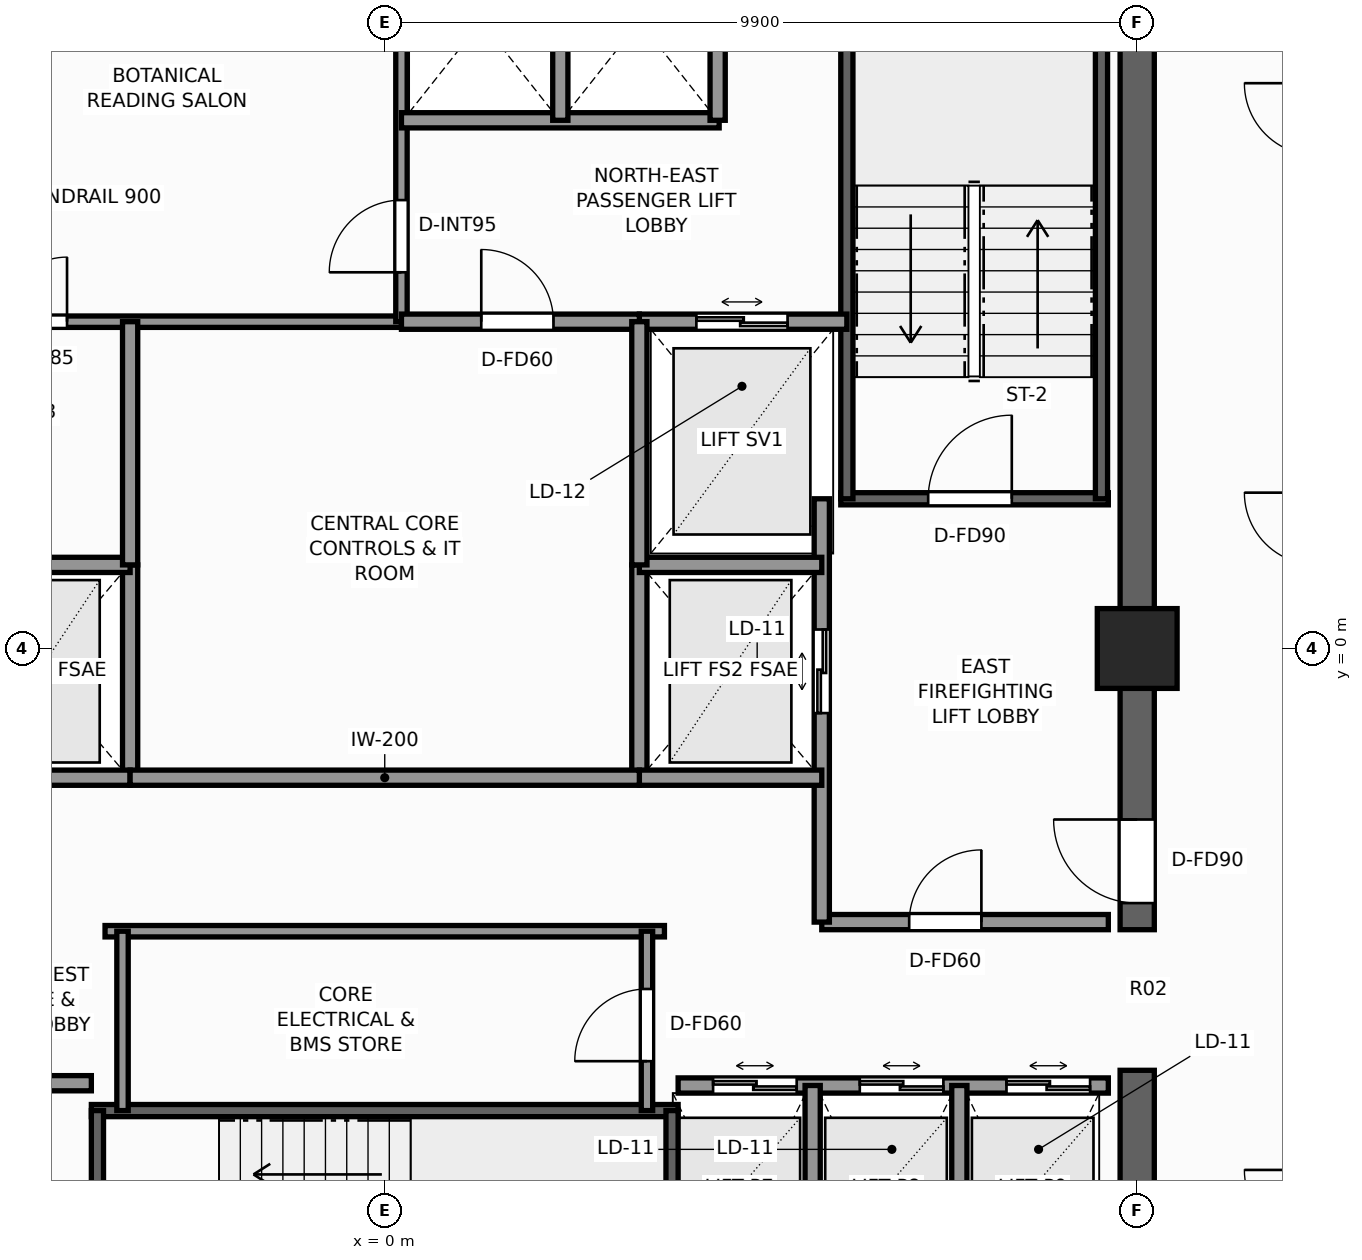
"""IFC4 building model, lengths in metres.
Left out: names, types, materials, properties, quantities, classifications, styles, units other than length and angle.
Written with IfcOpenShell. Run it as: python <this file> out.ifc"""

import sys

from ifc_helpers import new_model, si_unit, direction, frame, frame_2d, origin, origin_2d, place, context, subcontext, project, spatial, rectangle, extrude, element, fill, save


model = new_model("IFC4")
c1 = context("Model", 3, precision=1e-05, world=origin(), true_north=direction((0.0, 1.0)))
c2 = subcontext(c1, "Body", "Model", "MODEL_VIEW")
j1 = project(units=[si_unit("LENGTHUNIT", "METRE"), si_unit("PLANEANGLEUNIT", "RADIAN")], contexts=[c1])
p1 = place(None, origin())
s1 = spatial("IfcSite", under=j1, at=p1, CompositionType="ELEMENT")
p2 = place(p1, origin())
s2 = spatial("IfcBuilding", under=s1, at=p2, CompositionType="ELEMENT")
p3 = place(p2, frame((0.0, 0.0, 216.3)))
s3 = spatial("IfcBuildingStorey", under=s2, at=p3, CompositionType="ELEMENT", Elevation=216.3)
p4 = place(p3, frame((9.9, -9.675, 0.0), z_axis=(0.0, 0.0, 1.0), x_axis=(0.0, 1.0, 0.0)))
e1 = element("IfcWall", 1, at=p4, inside=s3, PredefinedType="SHEAR", context=c2, shape_type="SweptSolid", body=[
    extrude(rectangle(XDim=4.125, YDim=0.45, at=frame_2d((2.062, 0.0))), origin(), (0.0, 0.0, 1.0), 3.3),
])
p5 = place(p3, frame((9.9, -3.7, 0.0), z_axis=(0.0, 0.0, 1.0), x_axis=(0.0, 1.0, 0.0)))
e2 = element("IfcWall", 2, at=p5, inside=s3, PredefinedType="SHEAR", context=c2, shape_type="SweptSolid", body=[
    extrude(rectangle(XDim=13.375, YDim=0.45, at=frame_2d((6.688, 0.0))), origin(), (0.0, 0.0, 1.0), 3.3),
])
p6 = place(p5, frame((0.35, 0.0, 0.0)))
e3 = element("IfcOpeningElement", 3, at=p6, cuts=e2, PredefinedType="OPENING", context=c2, shape_type="SweptSolid", body=[
    extrude(rectangle(XDim=1.1, YDim=2.2, at=frame_2d((0.55, 1.1))), frame((0.0, 0.235, 0.0), z_axis=(0.0, -1.0, 0.0), x_axis=(1.0, 0.0, 0.0)), (0.0, 0.0, 1.0), 0.47),
])
p7 = place(p3, frame((9.9, 0.0, 0.0), z_axis=(0.0, 0.0, 1.0), x_axis=(1.0, 0.0, 0.0)))
e4 = element("IfcColumn", 4, at=p7, inside=s3, PredefinedType="COLUMN", context=c2, shape_type="SweptSolid", body=[
    extrude(rectangle(XDim=1.05, YDim=1.05, at=origin_2d()), origin(), (0.0, 0.0, 1.0), 3.3),
])
p8 = place(p3, frame((6.0, 1.97, 0.0), z_axis=(0.0, 0.0, 1.0), x_axis=(1.0, 0.0, 0.0)))
e5 = element("IfcWall", 5, at=p8, inside=s3, PredefinedType="SHEAR", context=c2, shape_type="SweptSolid", body=[
    extrude(rectangle(XDim=3.52, YDim=0.16, at=frame_2d((1.76, 0.0))), origin(), (0.0, 0.0, 1.0), 3.3),
])
p9 = place(p8, frame((1.15, 0.0, 0.0)))
e6 = element("IfcOpeningElement", 6, at=p9, cuts=e5, PredefinedType="OPENING", context=c2, shape_type="SweptSolid", body=[
    extrude(rectangle(XDim=1.1, YDim=2.2, at=frame_2d((0.55, 1.1))), frame((0.0, 0.09, 0.0), z_axis=(0.0, -1.0, 0.0), x_axis=(1.0, 0.0, 0.0)), (0.0, 0.0, 1.0), 0.18),
])
for number, where, z_axis, x_axis in (
    (7, (6.08, 1.97, 0.0), (0.0, 0.0, 1.0), (0.0, 1.0, 0.0)),
    (8, (9.43, 1.97, 0.0), (0.0, 0.0, 1.0), (0.0, 1.0, 0.0)),
):
    element("IfcWall", number, at=place(p3, frame(where, z_axis=z_axis, x_axis=x_axis)), inside=s3, PredefinedType="SHEAR", context=c2, shape_type="SweptSolid", body=[
        extrude(rectangle(XDim=7.56, YDim=0.16, at=frame_2d((3.78, 0.0))), origin(), (0.0, 0.0, 1.0), 3.3),
    ])
p10 = place(p3, frame((-3.86, -6.08, 0.0), z_axis=(0.0, 0.0, 1.0), x_axis=(1.0, 0.0, 0.0)))
e9 = element("IfcWall", 9, at=p10, inside=s3, PredefinedType="SHEAR", context=c2, shape_type="SweptSolid", body=[
    extrude(rectangle(XDim=7.72, YDim=0.16, at=frame_2d((3.86, 0.0))), origin(), (0.0, 0.0, 1.0), 3.3),
])
for number, where, z_axis, x_axis in (
    (10, (-3.78, -9.43, 0.0), (0.0, 0.0, 1.0), (0.0, 1.0, 0.0)),
    (11, (3.78, -9.43, 0.0), (0.0, 0.0, 1.0), (0.0, 1.0, 0.0)),
):
    element("IfcWall", number, at=place(p3, frame(where, z_axis=z_axis, x_axis=x_axis)), inside=s3, PredefinedType="SHEAR", context=c2, shape_type="SweptSolid", body=[
        extrude(rectangle(XDim=3.35, YDim=0.16, at=frame_2d((1.675, 0.0))), origin(), (0.0, 0.0, 1.0), 3.3),
    ])
p11 = place(p3, frame((-3.35, -1.7, 0.0), z_axis=(0.0, 0.0, 1.0), x_axis=(0.0, 1.0, 0.0)))
e12 = element("IfcWall", 12, at=p11, inside=s3, PredefinedType="SOLIDWALL", context=c2, shape_type="SweptSolid", body=[
    extrude(rectangle(XDim=2.8, YDim=0.2, at=frame_2d((1.4, 0.0))), origin(), (0.0, 0.0, 1.0), 3.08),
])
for number, where, z_axis, x_axis in (
    (13, (-5.75, -1.7, 0.0), (0.0, 0.0, 1.0), (1.0, 0.0, 0.0)),
    (14, (-5.75, 1.1, 0.0), (0.0, 0.0, 1.0), (1.0, 0.0, 0.0)),
):
    element("IfcWall", number, at=place(p3, frame(where, z_axis=z_axis, x_axis=x_axis)), inside=s3, PredefinedType="SOLIDWALL", context=c2, shape_type="SweptSolid", body=[
        extrude(rectangle(XDim=2.4, YDim=0.2, at=frame_2d((1.2, 0.0))), origin(), (0.0, 0.0, 1.0), 3.08),
    ])
p12 = place(p3, frame((5.75, -3.6, 0.0), z_axis=(0.0, 0.0, 1.0), x_axis=(1.0, 0.0, 0.0)))
e15 = element("IfcWall", 15, at=p12, inside=s3, PredefinedType="SOLIDWALL", context=c2, shape_type="SweptSolid", body=[
    extrude(rectangle(XDim=3.77, YDim=0.2, at=frame_2d((1.885, 0.0))), origin(), (0.0, 0.0, 1.0), 3.08),
])
p13 = place(p12, frame((1.15, 0.0, 0.0)))
e16 = element("IfcOpeningElement", 16, at=p13, cuts=e15, PredefinedType="OPENING", context=c2, shape_type="SweptSolid", body=[
    extrude(rectangle(XDim=0.95, YDim=2.06, at=frame_2d((0.475, 1.03))), frame((0.0, 0.11, 0.0), z_axis=(0.0, -1.0, 0.0), x_axis=(1.0, 0.0, 0.0)), (0.0, 0.0, 1.0), 0.22),
])
p14 = place(p3, frame((5.75, -3.6, 0.0), z_axis=(0.0, 0.0, 1.0), x_axis=(0.0, 1.0, 0.0)))
e17 = element("IfcWall", 17, at=p14, inside=s3, PredefinedType="SOLIDWALL", context=c2, shape_type="SweptSolid", body=[
    extrude(rectangle(XDim=5.57, YDim=0.2, at=frame_2d((2.785, 0.0))), origin(), (0.0, 0.0, 1.0), 3.08),
])
p15 = place(p14, frame((2.75, 0.0, 0.0)))
e18 = element("IfcOpeningElement", 18, at=p15, cuts=e17, PredefinedType="OPENING", context=c2, shape_type="SweptSolid", body=[
    extrude(rectangle(XDim=1.1, YDim=2.2, at=frame_2d((0.55, 1.1))), frame((0.0, 0.11, 0.0), z_axis=(0.0, -1.0, 0.0), x_axis=(1.0, 0.0, 0.0)), (0.0, 0.0, 1.0), 0.22),
])
p16 = place(p3, frame((3.35, -1.7, 0.0), z_axis=(0.0, 0.0, 1.0), x_axis=(0.0, 1.0, 0.0)))
e19 = element("IfcWall", 19, at=p16, inside=s3, PredefinedType="SOLIDWALL", context=c2, shape_type="SweptSolid", body=[
    extrude(rectangle(XDim=2.8, YDim=0.2, at=frame_2d((1.4, 0.0))), origin(), (0.0, 0.0, 1.0), 3.08),
])
for number, where, z_axis, x_axis in (
    (20, (3.35, -1.7, 0.0), (0.0, 0.0, 1.0), (1.0, 0.0, 0.0)),
    (21, (3.35, 1.1, 0.0), (0.0, 0.0, 1.0), (1.0, 0.0, 0.0)),
):
    element("IfcWall", number, at=place(p3, frame(where, z_axis=z_axis, x_axis=x_axis)), inside=s3, PredefinedType="SOLIDWALL", context=c2, shape_type="SweptSolid", body=[
        extrude(rectangle(XDim=2.4, YDim=0.2, at=frame_2d((1.2, 0.0))), origin(), (0.0, 0.0, 1.0), 3.08),
    ])
p17 = place(p3, frame((3.35, 4.3, 0.0), z_axis=(0.0, 0.0, 1.0), x_axis=(1.0, 0.0, 0.0)))
e22 = element("IfcWall", 22, at=p17, inside=s3, PredefinedType="SOLIDWALL", context=c2, shape_type="SweptSolid", body=[
    extrude(rectangle(XDim=2.73, YDim=0.2, at=frame_2d((1.365, 0.0))), origin(), (0.0, 0.0, 1.0), 3.08),
])
p18 = place(p17, frame((0.75, 0.0, 0.0)))
e23 = element("IfcOpeningElement", 23, at=p18, cuts=e22, PredefinedType="OPENING", context=c2, shape_type="SweptSolid", body=[
    extrude(rectangle(XDim=1.2, YDim=2.25, at=frame_2d((0.6, 1.125))), frame((0.0, 0.11, 0.0), z_axis=(0.0, -1.0, 0.0), x_axis=(1.0, 0.0, 0.0)), (0.0, 0.0, 1.0), 0.22),
])
p19 = place(p3, frame((-6.08, 4.3, 0.0), z_axis=(0.0, 0.0, 1.0), x_axis=(1.0, 0.0, 0.0)))
e24 = element("IfcWall", 24, at=p19, inside=s3, PredefinedType="PARTITIONING", context=c2, shape_type="SweptSolid", body=[
    extrude(rectangle(XDim=6.3, YDim=0.15, at=frame_2d((3.15, 0.0))), origin(), (0.0, 0.0, 1.0), 3.08),
])
p20 = place(p19, frame((1.05, 0.0, 0.0)))
e25 = element("IfcOpeningElement", 25, at=p20, cuts=e24, PredefinedType="OPENING", context=c2, shape_type="SweptSolid", body=[
    extrude(rectangle(XDim=0.85, YDim=2.03, at=frame_2d((0.425, 1.015))), frame((0.0, 0.085, 0.0), z_axis=(0.0, -1.0, 0.0), x_axis=(1.0, 0.0, 0.0)), (0.0, 0.0, 1.0), 0.17),
])
p21 = place(p3, frame((0.22, 4.3, 0.0), z_axis=(0.0, 0.0, 1.0), x_axis=(0.0, 1.0, 0.0)))
e26 = element("IfcWall", 26, at=p21, inside=s3, PredefinedType="PARTITIONING", context=c2, shape_type="SweptSolid", body=[
    extrude(rectangle(XDim=5.22, YDim=0.15, at=frame_2d((2.61, 0.0))), origin(), (0.0, 0.0, 1.0), 3.08),
])
p22 = place(p21, frame((0.65, 0.0, 0.0)))
e27 = element("IfcOpeningElement", 27, at=p22, cuts=e26, PredefinedType="OPENING", context=c2, shape_type="SweptSolid", body=[
    extrude(rectangle(XDim=0.95, YDim=2.06, at=frame_2d((0.475, 1.03))), frame((0.0, 0.085, 0.0), z_axis=(0.0, -1.0, 0.0), x_axis=(1.0, 0.0, 0.0)), (0.0, 0.0, 1.0), 0.17),
])
p23 = place(p3, frame((0.22, 6.95, 0.0), z_axis=(0.0, 0.0, 1.0), x_axis=(1.0, 0.0, 0.0)))
e28 = element("IfcWall", 28, at=p23, inside=s3, PredefinedType="SOLIDWALL", context=c2, shape_type="SweptSolid", body=[
    extrude(rectangle(XDim=4.18, YDim=0.2, at=frame_2d((2.09, 0.0))), origin(), (0.0, 0.0, 1.0), 3.08),
])
for number, where, z_axis, x_axis in (
    (29, (4.38, 6.95, 0.0), (0.0, 0.0, 1.0), (0.0, 1.0, 0.0)),
    (30, (2.31, 6.95, 0.0), (0.0, 0.0, 1.0), (0.0, 1.0, 0.0)),
):
    element("IfcWall", number, at=place(p3, frame(where, z_axis=z_axis, x_axis=x_axis)), inside=s3, PredefinedType="SOLIDWALL", context=c2, shape_type="SweptSolid", body=[
        extrude(rectangle(XDim=2.57, YDim=0.2, at=frame_2d((1.285, 0.0))), origin(), (0.0, 0.0, 1.0), 3.08),
    ])
p24 = place(p3, frame((-9.52, -5.72, 0.0), z_axis=(0.0, 0.0, 1.0), x_axis=(1.0, 0.0, 0.0)))
e31 = element("IfcWall", 31, at=p24, inside=s3, PredefinedType="SOLIDWALL", context=c2, shape_type="SweptSolid", body=[
    extrude(rectangle(XDim=5.66, YDim=0.2, at=frame_2d((2.83, 0.0))), origin(), (0.0, 0.0, 1.0), 3.08),
])
p25 = place(p24, frame((1.8, 0.0, 0.0)))
e32 = element("IfcOpeningElement", 32, at=p25, cuts=e31, PredefinedType="OPENING", context=c2, shape_type="SweptSolid", body=[
    extrude(rectangle(XDim=0.95, YDim=2.06, at=frame_2d((0.475, 1.03))), frame((0.0, 0.11, 0.0), z_axis=(0.0, -1.0, 0.0), x_axis=(1.0, 0.0, 0.0)), (0.0, 0.0, 1.0), 0.22),
])
p26 = place(p3, frame((3.86, -5.75, 0.0), z_axis=(0.0, 0.0, 1.0), x_axis=(1.0, 0.0, 0.0)))
e33 = element("IfcWall", 33, at=p26, inside=s3, PredefinedType="SOLIDWALL", context=c2, shape_type="SweptSolid", body=[
    extrude(rectangle(XDim=5.66, YDim=0.2, at=frame_2d((2.83, 0.0))), origin(), (0.0, 0.0, 1.0), 3.08),
])
p27 = place(p26, frame((0.46, 0.0, 0.0)))
e34 = element("IfcOpeningElement", 34, at=p27, cuts=e33, PredefinedType="OPENING", context=c2, shape_type="SweptSolid", body=[
    extrude(rectangle(XDim=1.1, YDim=2.2, at=frame_2d((0.55, 1.1))), frame((0.0, 0.11, 0.0), z_axis=(0.0, -1.0, 0.0), x_axis=(1.0, 0.0, 0.0)), (0.0, 0.0, 1.0), 0.22),
])
p28 = place(p26, frame((2.39, 0.0, 0.0)))
e35 = element("IfcOpeningElement", 35, at=p28, cuts=e33, PredefinedType="OPENING", context=c2, shape_type="SweptSolid", body=[
    extrude(rectangle(XDim=1.1, YDim=2.2, at=frame_2d((0.55, 1.1))), frame((0.0, 0.11, 0.0), z_axis=(0.0, -1.0, 0.0), x_axis=(1.0, 0.0, 0.0)), (0.0, 0.0, 1.0), 0.22),
])
p29 = place(p26, frame((4.32, 0.0, 0.0)))
e36 = element("IfcOpeningElement", 36, at=p29, cuts=e33, PredefinedType="OPENING", context=c2, shape_type="SweptSolid", body=[
    extrude(rectangle(XDim=1.1, YDim=2.2, at=frame_2d((0.55, 1.1))), frame((0.0, 0.11, 0.0), z_axis=(0.0, -1.0, 0.0), x_axis=(1.0, 0.0, 0.0)), (0.0, 0.0, 1.0), 0.22),
])
for number, where, z_axis, x_axis in (
    (37, (5.63, -9.52, 0.0), (0.0, 0.0, 1.0), (0.0, 1.0, 0.0)),
    (38, (7.56, -9.52, 0.0), (0.0, 0.0, 1.0), (0.0, 1.0, 0.0)),
):
    element("IfcWall", number, at=place(p3, frame(where, z_axis=z_axis, x_axis=x_axis)), inside=s3, PredefinedType="SOLIDWALL", context=c2, shape_type="SweptSolid", body=[
        extrude(rectangle(XDim=3.77, YDim=0.2, at=frame_2d((1.885, 0.0))), origin(), (0.0, 0.0, 1.0), 3.08),
    ])
p30 = place(p3, frame((0.22, 4.3, 0.0), z_axis=(0.0, 0.0, 1.0), x_axis=(1.0, 0.0, 0.0)))
e39 = element("IfcWall", 39, at=p30, inside=s3, PredefinedType="SOLIDWALL", context=c2, shape_type="SweptSolid", body=[
    extrude(rectangle(XDim=3.13, YDim=0.2, at=frame_2d((1.565, 0.0))), origin(), (0.0, 0.0, 1.0), 3.08),
])
p31 = place(p30, frame((1.05, 0.0, 0.0)))
e40 = element("IfcOpeningElement", 40, at=p31, cuts=e39, PredefinedType="OPENING", context=c2, shape_type="SweptSolid", body=[
    extrude(rectangle(XDim=0.95, YDim=2.06, at=frame_2d((0.475, 1.03))), frame((0.0, 0.11, 0.0), z_axis=(0.0, -1.0, 0.0), x_axis=(1.0, 0.0, 0.0)), (0.0, 0.0, 1.0), 0.22),
])
p32 = place(p3, frame((-3.35, -1.7, 0.0), z_axis=(0.0, 0.0, 1.0), x_axis=(1.0, 0.0, 0.0)))
e41 = element("IfcWall", 41, at=p32, inside=s3, PredefinedType="SOLIDWALL", context=c2, shape_type="SweptSolid", body=[
    extrude(rectangle(XDim=6.7, YDim=0.2, at=frame_2d((3.35, 0.0))), origin(), (0.0, 0.0, 1.0), 3.08),
])
for number, where, z_axis, x_axis in (
    (42, (-3.35, 1.1, 0.0), (0.0, 0.0, 1.0), (0.0, 1.0, 0.0)),
    (43, (3.35, 1.1, 0.0), (0.0, 0.0, 1.0), (0.0, 1.0, 0.0)),
):
    element("IfcWall", number, at=place(p3, frame(where, z_axis=z_axis, x_axis=x_axis)), inside=s3, PredefinedType="SOLIDWALL", context=c2, shape_type="SweptSolid", body=[
        extrude(rectangle(XDim=3.2, YDim=0.2, at=frame_2d((1.6, 0.0))), origin(), (0.0, 0.0, 1.0), 3.08),
    ])
p33 = place(p3, frame((-3.68, -3.72, 0.0), z_axis=(0.0, 0.0, 1.0), x_axis=(1.0, 0.0, 0.0)))
e44 = element("IfcWall", 44, at=p33, inside=s3, PredefinedType="PARTITIONING", context=c2, shape_type="SweptSolid", body=[
    extrude(rectangle(XDim=7.36, YDim=0.15, at=frame_2d((3.68, 0.0))), origin(), (0.0, 0.0, 1.0), 3.08),
])
p34 = place(p3, frame((3.45, -6.08, 0.0), z_axis=(0.0, 0.0, 1.0), x_axis=(0.0, 1.0, 0.0)))
e45 = element("IfcWall", 45, at=p34, inside=s3, PredefinedType="PARTITIONING", context=c2, shape_type="SweptSolid", body=[
    extrude(rectangle(XDim=2.36, YDim=0.15, at=frame_2d((1.18, 0.0))), origin(), (0.0, 0.0, 1.0), 3.08),
])
p35 = place(p34, frame((0.65, 0.0, 0.0)))
e46 = element("IfcOpeningElement", 46, at=p35, cuts=e45, PredefinedType="OPENING", context=c2, shape_type="SweptSolid", body=[
    extrude(rectangle(XDim=0.95, YDim=2.06, at=frame_2d((0.475, 1.03))), frame((0.0, 0.085, 0.0), z_axis=(0.0, -1.0, 0.0), x_axis=(1.0, 0.0, 0.0)), (0.0, 0.0, 1.0), 0.17),
])
p36 = place(p3, frame((-3.45, -6.08, 0.0), z_axis=(0.0, 0.0, 1.0), x_axis=(0.0, 1.0, 0.0)))
e47 = element("IfcWall", 47, at=p36, inside=s3, PredefinedType="PARTITIONING", context=c2, shape_type="SweptSolid", body=[
    extrude(rectangle(XDim=2.36, YDim=0.15, at=frame_2d((1.18, 0.0))), origin(), (0.0, 0.0, 1.0), 3.08),
])
p37 = place(p9, origin())
e48 = element("IfcDoor", 48, at=p37, inside=s3, OperationType="SINGLE_SWING_RIGHT", PredefinedType="DOOR", context=c2, shape_type="SweptSolid", body=[
    extrude(rectangle(XDim=1.1, YDim=2.2, at=frame_2d((0.55, 1.1))), frame((0.0, 0.025, 0.0), z_axis=(0.0, -1.0, 0.0), x_axis=(1.0, 0.0, 0.0)), (0.0, 0.0, 1.0), 0.05),
])
fill(e6, e48)
p38 = place(p6, origin())
e49 = element("IfcDoor", 49, at=p38, inside=s3, OperationType="SINGLE_SWING_RIGHT", PredefinedType="DOOR", context=c2, shape_type="SweptSolid", body=[
    extrude(rectangle(XDim=1.1, YDim=2.2, at=frame_2d((0.55, 1.1))), frame((0.0, 0.025, 0.0), z_axis=(0.0, -1.0, 0.0), x_axis=(1.0, 0.0, 0.0)), (0.0, 0.0, 1.0), 0.05),
])
fill(e3, e49)
p39 = place(p15, origin())
e50 = element("IfcDoor", 50, at=p39, inside=s3, OperationType="DOUBLE_DOOR_SLIDING", PredefinedType="DOOR", context=c2, shape_type="SweptSolid", body=[
    extrude(rectangle(XDim=1.1, YDim=2.2, at=frame_2d((0.55, 1.1))), frame((0.0, 0.025, 0.0), z_axis=(0.0, -1.0, 0.0), x_axis=(1.0, 0.0, 0.0)), (0.0, 0.0, 1.0), 0.05),
])
fill(e18, e50)
p40 = place(p18, origin())
e51 = element("IfcDoor", 51, at=p40, inside=s3, OperationType="DOUBLE_DOOR_SLIDING", PredefinedType="DOOR", context=c2, shape_type="SweptSolid", body=[
    extrude(rectangle(XDim=1.2, YDim=2.25, at=frame_2d((0.6, 1.125))), frame((0.0, 0.025, 0.0), z_axis=(0.0, -1.0, 0.0), x_axis=(1.0, 0.0, 0.0)), (0.0, 0.0, 1.0), 0.05),
])
fill(e23, e51)
p41 = place(p22, origin())
e52 = element("IfcDoor", 52, at=p41, inside=s3, OperationType="SINGLE_SWING_LEFT", PredefinedType="DOOR", context=c2, shape_type="SweptSolid", body=[
    extrude(rectangle(XDim=0.95, YDim=2.06, at=frame_2d((0.475, 1.03))), frame((0.0, 0.025, 0.0), z_axis=(0.0, -1.0, 0.0), x_axis=(1.0, 0.0, 0.0)), (0.0, 0.0, 1.0), 0.05),
])
fill(e27, e52)
p42 = place(p27, origin())
e53 = element("IfcDoor", 53, at=p42, inside=s3, OperationType="DOUBLE_DOOR_SLIDING", PredefinedType="DOOR", context=c2, shape_type="SweptSolid", body=[
    extrude(rectangle(XDim=1.1, YDim=2.2, at=frame_2d((0.55, 1.1))), frame((0.0, 0.025, 0.0), z_axis=(0.0, -1.0, 0.0), x_axis=(1.0, 0.0, 0.0)), (0.0, 0.0, 1.0), 0.05),
])
fill(e34, e53)
p43 = place(p28, origin())
e54 = element("IfcDoor", 54, at=p43, inside=s3, OperationType="DOUBLE_DOOR_SLIDING", PredefinedType="DOOR", context=c2, shape_type="SweptSolid", body=[
    extrude(rectangle(XDim=1.1, YDim=2.2, at=frame_2d((0.55, 1.1))), frame((0.0, 0.025, 0.0), z_axis=(0.0, -1.0, 0.0), x_axis=(1.0, 0.0, 0.0)), (0.0, 0.0, 1.0), 0.05),
])
fill(e35, e54)
p44 = place(p29, origin())
e55 = element("IfcDoor", 55, at=p44, inside=s3, OperationType="DOUBLE_DOOR_SLIDING", PredefinedType="DOOR", context=c2, shape_type="SweptSolid", body=[
    extrude(rectangle(XDim=1.1, YDim=2.2, at=frame_2d((0.55, 1.1))), frame((0.0, 0.025, 0.0), z_axis=(0.0, -1.0, 0.0), x_axis=(1.0, 0.0, 0.0)), (0.0, 0.0, 1.0), 0.05),
])
fill(e36, e55)
p45 = place(p13, origin())
e56 = element("IfcDoor", 56, at=p45, inside=s3, OperationType="SINGLE_SWING_RIGHT", PredefinedType="DOOR", context=c2, shape_type="SweptSolid", body=[
    extrude(rectangle(XDim=0.95, YDim=2.06, at=frame_2d((0.475, 1.03))), frame((0.0, 0.025, 0.0), z_axis=(0.0, -1.0, 0.0), x_axis=(1.0, 0.0, 0.0)), (0.0, 0.0, 1.0), 0.05),
])
fill(e16, e56)
p46 = place(p31, origin())
e57 = element("IfcDoor", 57, at=p46, inside=s3, OperationType="SINGLE_SWING_LEFT", PredefinedType="DOOR", context=c2, shape_type="SweptSolid", body=[
    extrude(rectangle(XDim=0.95, YDim=2.06, at=frame_2d((0.475, 1.03))), frame((0.0, 0.025, 0.0), z_axis=(0.0, -1.0, 0.0), x_axis=(1.0, 0.0, 0.0)), (0.0, 0.0, 1.0), 0.05),
])
fill(e40, e57)
p47 = place(p35, origin())
e58 = element("IfcDoor", 58, at=p47, inside=s3, OperationType="SINGLE_SWING_LEFT", PredefinedType="DOOR", context=c2, shape_type="SweptSolid", body=[
    extrude(rectangle(XDim=0.95, YDim=2.06, at=frame_2d((0.475, 1.03))), frame((0.0, 0.025, 0.0), z_axis=(0.0, -1.0, 0.0), x_axis=(1.0, 0.0, 0.0)), (0.0, 0.0, 1.0), 0.05),
])
fill(e46, e58)
p48 = place(p20, origin())
e59 = element("IfcDoor", 59, at=p48, inside=s3, OperationType="SINGLE_SWING_RIGHT", PredefinedType="DOOR", context=c2, shape_type="SweptSolid", body=[
    extrude(rectangle(XDim=0.85, YDim=2.03, at=frame_2d((0.425, 1.015))), frame((0.0, 0.025, 0.0), z_axis=(0.0, -1.0, 0.0), x_axis=(1.0, 0.0, 0.0)), (0.0, 0.0, 1.0), 0.05),
])
fill(e25, e59)
save(model, sys.argv[1])
